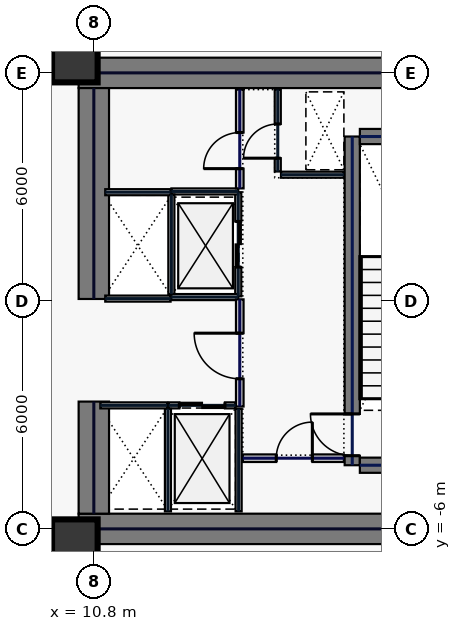
"""IFC4 building model, lengths in metres.
Left out: names, types, materials, properties, quantities, classifications, styles, units other than length and angle.
Written with IfcOpenShell. Run it as: python <this file> out.ifc"""

import sys

from ifc_helpers import new_model, si_unit, direction, frame, frame_2d, origin, origin_2d, place, context, subcontext, project, spatial, rectangle, hollow_rectangle, extrude, element, fill, save


model = new_model("IFC4")
c1 = context("Model", 3, precision=1e-05, world=origin(), true_north=direction((0.0, 1.0)))
c2 = subcontext(c1, "Body", "Model", "MODEL_VIEW")
j1 = project(units=[si_unit("LENGTHUNIT", "METRE"), si_unit("PLANEANGLEUNIT", "RADIAN")], contexts=[c1])
p1 = place(None, origin())
s1 = spatial("IfcSite", under=j1, at=p1, CompositionType="ELEMENT")
p2 = place(p1, origin())
s2 = spatial("IfcBuilding", under=s1, at=p2, CompositionType="ELEMENT")
p3 = place(p2, frame((0.0, 0.0, 43.4)))
s3 = spatial("IfcBuildingStorey", under=s2, at=p3, CompositionType="ELEMENT", Elevation=43.4)
for number, where, z_axis, x_axis in (
    (1, (10.4, 6.0, 0.0), (0.0, 0.0, 1.0), (1.0, 0.0, 0.0)),
    (2, (10.4, -6.0, 0.0), (0.0, 0.0, 1.0), (1.0, 0.0, 0.0)),
):
    element("IfcWall", number, at=place(p3, frame(where, z_axis=z_axis, x_axis=x_axis)), inside=s3, PredefinedType="SHEAR", context=c2, shape_type="SweptSolid", body=[
        extrude(rectangle(XDim=11.6, YDim=0.8, at=frame_2d((5.8, 0.0))), origin(), (0.0, 0.0, 1.0), 3.74),
    ])
p4 = place(p3, frame((10.8, -5.6, 0.0), z_axis=(0.0, 0.0, 1.0), x_axis=(0.0, 1.0, 0.0)))
e3 = element("IfcWall", 3, at=p4, inside=s3, PredefinedType="SHEAR", context=c2, shape_type="SweptSolid", body=[
    extrude(rectangle(XDim=2.95, YDim=0.8, at=frame_2d((1.475, 0.0))), origin(), (0.0, 0.0, 1.0), 3.74),
])
p5 = place(p3, frame((10.8, 0.05, 0.0), z_axis=(0.0, 0.0, 1.0), x_axis=(0.0, 1.0, 0.0)))
e4 = element("IfcWall", 4, at=p5, inside=s3, PredefinedType="SHEAR", context=c2, shape_type="SweptSolid", body=[
    extrude(rectangle(XDim=5.55, YDim=0.8, at=frame_2d((2.775, 0.0))), origin(), (0.0, 0.0, 1.0), 3.74),
])
p6 = place(p3, frame((17.6, -4.325, 0.0), z_axis=(0.0, 0.0, 1.0), x_axis=(0.0, 1.0, 0.0)))
e5 = element("IfcWall", 5, at=p6, inside=s3, PredefinedType="SHEAR", context=c2, shape_type="SweptSolid", body=[
    extrude(rectangle(XDim=8.65, YDim=0.4, at=frame_2d((4.325, 0.0))), origin(), (0.0, 0.0, 1.0), 3.74),
])
p7 = place(p6, frame((0.25, 0.0, 0.0)))
e6 = element("IfcOpeningElement", 6, at=p7, cuts=e5, PredefinedType="OPENING", context=c2, shape_type="SweptSolid", body=[
    extrude(rectangle(XDim=1.1, YDim=2.2, at=frame_2d((0.55, 1.1))), frame((0.0, 0.21, 0.0), z_axis=(0.0, -1.0, 0.0), x_axis=(1.0, 0.0, 0.0)), (0.0, 0.0, 1.0), 0.42),
])
for number, where, z_axis, x_axis in (
    (7, (17.8, -4.325, 0.0), (0.0, 0.0, 1.0), (1.0, 0.0, 0.0)),
    (8, (17.8, 4.325, 0.0), (0.0, 0.0, 1.0), (1.0, 0.0, 0.0)),
):
    element("IfcWall", number, at=place(p3, frame(where, z_axis=z_axis, x_axis=x_axis)), inside=s3, PredefinedType="SHEAR", context=c2, shape_type="SweptSolid", body=[
        extrude(rectangle(XDim=3.4, YDim=0.4, at=frame_2d((1.7, 0.0))), origin(), (0.0, 0.0, 1.0), 3.74),
    ])
for number, where, z_axis, x_axis in (
    (9, (10.3, -6.35, 0.0), (0.0, 0.0, 1.0), (1.0, 0.0, 0.0)),
    (10, (10.3, 6.35, 0.0), (0.0, 0.0, 1.0), (1.0, 0.0, 0.0)),
):
    element("IfcColumn", number, at=place(p3, frame(where, z_axis=z_axis, x_axis=x_axis)), inside=s3, PredefinedType="COLUMN", context=c2, shape_type="SweptSolid", body=[
        extrude(hollow_rectangle(XDim=1.2, YDim=1.2, WallThickness=0.05, at=origin_2d()), origin(), (0.0, 0.0, 1.0), 3.74),
    ])
p8 = place(p3, frame((14.6, 0.12, 0.0), z_axis=(0.0, 0.0, 1.0), x_axis=(0.0, 1.0, 0.0)))
e11 = element("IfcWall", 11, at=p8, inside=s3, PredefinedType="PARTITIONING", context=c2, shape_type="SweptSolid", body=[
    extrude(rectangle(XDim=2.74, YDim=0.16, at=frame_2d((1.37, 0.0))), origin(), (0.0, 0.0, 1.0), 3.74),
])
p9 = place(p8, frame((0.77, 0.0, 0.0)))
e12 = element("IfcOpeningElement", 12, at=p9, cuts=e11, PredefinedType="OPENING", context=c2, shape_type="SweptSolid", body=[
    extrude(rectangle(XDim=1.2, YDim=2.2, at=frame_2d((0.6, 1.1))), frame((0.0, 0.09, 0.0), z_axis=(0.0, -1.0, 0.0), x_axis=(1.0, 0.0, 0.0)), (0.0, 0.0, 1.0), 0.18),
])
for number, where, z_axis, x_axis in (
    (13, (12.84, 0.1, 0.0), (0.0, 0.0, 1.0), (1.0, 0.0, 0.0)),
    (14, (12.84, 2.88, 0.0), (0.0, 0.0, 1.0), (1.0, 0.0, 0.0)),
):
    element("IfcWall", number, at=place(p3, frame(where, z_axis=z_axis, x_axis=x_axis)), inside=s3, PredefinedType="PARTITIONING", context=c2, shape_type="SweptSolid", body=[
        extrude(rectangle(XDim=1.76, YDim=0.16, at=frame_2d((0.88, 0.0))), origin(), (0.0, 0.0, 1.0), 3.74),
    ])
p10 = place(p3, frame((12.84, 0.18, 0.0), z_axis=(0.0, 0.0, 1.0), x_axis=(0.0, 1.0, 0.0)))
e15 = element("IfcWall", 15, at=p10, inside=s3, PredefinedType="PARTITIONING", context=c2, shape_type="SweptSolid", body=[
    extrude(rectangle(XDim=2.62, YDim=0.16, at=frame_2d((1.31, 0.0))), origin(), (0.0, 0.0, 1.0), 3.74),
])
p11 = place(p3, frame((12.77, -2.75, 0.0), z_axis=(0.0, 0.0, 1.0), x_axis=(1.0, 0.0, 0.0)))
e16 = element("IfcWall", 16, at=p11, inside=s3, PredefinedType="PARTITIONING", context=c2, shape_type="SweptSolid", body=[
    extrude(rectangle(XDim=1.76, YDim=0.16, at=frame_2d((0.88, 0.0))), origin(), (0.0, 0.0, 1.0), 3.74),
])
p12 = place(p11, frame((0.28, 0.0, 0.0)))
e17 = element("IfcOpeningElement", 17, at=p12, cuts=e16, PredefinedType="OPENING", context=c2, shape_type="SweptSolid", body=[
    extrude(rectangle(XDim=1.2, YDim=2.2, at=frame_2d((0.6, 1.1))), frame((0.0, 0.09, 0.0), z_axis=(0.0, -1.0, 0.0), x_axis=(1.0, 0.0, 0.0)), (0.0, 0.0, 1.0), 0.18),
])
for number, where, z_axis, x_axis in (
    (18, (12.75, -5.54, 0.0), (0.0, 0.0, 1.0), (0.0, 1.0, 0.0)),
    (19, (14.61, -5.54, 0.0), (0.0, 0.0, 1.0), (0.0, 1.0, 0.0)),
):
    element("IfcWall", number, at=place(p3, frame(where, z_axis=z_axis, x_axis=x_axis)), inside=s3, PredefinedType="PARTITIONING", context=c2, shape_type="SweptSolid", body=[
        extrude(rectangle(XDim=2.7, YDim=0.16, at=frame_2d((1.35, 0.0))), origin(), (0.0, 0.0, 1.0), 3.74),
    ])
p13 = place(p3, frame((10.97, -2.75, 0.0), z_axis=(0.0, 0.0, 1.0), x_axis=(1.0, 0.0, 0.0)))
e20 = element("IfcWall", 20, at=p13, inside=s3, PredefinedType="PARTITIONING", context=c2, shape_type="SweptSolid", body=[
    extrude(rectangle(XDim=1.76, YDim=0.16, at=frame_2d((0.88, 0.0))), origin(), (0.0, 0.0, 1.0), 3.74),
])
for number, where, z_axis, x_axis in (
    (21, (11.1, 0.06, 0.0), (0.0, 0.0, 1.0), (1.0, 0.0, 0.0)),
    (22, (11.1, 2.86, 0.0), (0.0, 0.0, 1.0), (1.0, 0.0, 0.0)),
):
    element("IfcWall", number, at=place(p3, frame(where, z_axis=z_axis, x_axis=x_axis)), inside=s3, PredefinedType="PARTITIONING", context=c2, shape_type="SweptSolid", body=[
        extrude(rectangle(XDim=1.72, YDim=0.16, at=frame_2d((0.86, 0.0))), origin(), (0.0, 0.0, 1.0), 3.74),
    ])
p14 = place(p3, frame((15.64, 3.405, 0.0), z_axis=(0.0, 0.0, 1.0), x_axis=(0.0, 1.0, 0.0)))
e23 = element("IfcWall", 23, at=p14, inside=s3, PredefinedType="PARTITIONING", context=c2, shape_type="SweptSolid", body=[
    extrude(rectangle(XDim=2.155, YDim=0.16, at=frame_2d((1.078, 0.0))), origin(), (0.0, 0.0, 1.0), 3.74),
])
p15 = place(p14, frame((0.35, 0.0, 0.0)))
e24 = element("IfcOpeningElement", 24, at=p15, cuts=e23, PredefinedType="OPENING", context=c2, shape_type="SweptSolid", body=[
    extrude(rectangle(XDim=0.9, YDim=2.2, at=frame_2d((0.45, 1.1))), frame((0.0, 0.09, 0.0), z_axis=(0.0, -1.0, 0.0), x_axis=(1.0, 0.0, 0.0)), (0.0, 0.0, 1.0), 0.18),
])
p16 = place(p3, frame((15.725, 3.32, 0.0), z_axis=(0.0, 0.0, 1.0), x_axis=(1.0, 0.0, 0.0)))
e25 = element("IfcWall", 25, at=p16, inside=s3, PredefinedType="PARTITIONING", context=c2, shape_type="SweptSolid", body=[
    extrude(rectangle(XDim=1.655, YDim=0.16, at=frame_2d((0.827, 0.0))), origin(), (0.0, 0.0, 1.0), 3.74),
])
p17 = place(p3, frame((14.72, -4.14, 0.0), z_axis=(0.0, 0.0, 1.0), x_axis=(1.0, 0.0, 0.0)))
e26 = element("IfcWall", 26, at=p17, inside=s3, PredefinedType="SOLIDWALL", context=c2, shape_type="SweptSolid", body=[
    extrude(rectangle(XDim=2.66, YDim=0.2, at=frame_2d((1.33, 0.0))), origin(), (0.0, 0.0, 1.0), 3.74),
])
p18 = place(p17, frame((0.88, 0.0, 0.0)))
e27 = element("IfcOpeningElement", 27, at=p18, cuts=e26, PredefinedType="OPENING", context=c2, shape_type="SweptSolid", body=[
    extrude(rectangle(XDim=0.95, YDim=2.2, at=frame_2d((0.475, 1.1))), frame((0.0, 0.11, 0.0), z_axis=(0.0, -1.0, 0.0), x_axis=(1.0, 0.0, 0.0)), (0.0, 0.0, 1.0), 0.22),
])
p19 = place(p3, frame((14.64, 2.96, 0.0), z_axis=(0.0, 0.0, 1.0), x_axis=(0.0, 1.0, 0.0)))
e28 = element("IfcWall", 28, at=p19, inside=s3, PredefinedType="SOLIDWALL", context=c2, shape_type="SweptSolid", body=[
    extrude(rectangle(XDim=2.6, YDim=0.2, at=frame_2d((1.3, 0.0))), origin(), (0.0, 0.0, 1.0), 3.74),
])
p20 = place(p19, frame((0.52, 0.0, 0.0)))
e29 = element("IfcOpeningElement", 29, at=p20, cuts=e28, PredefinedType="OPENING", context=c2, shape_type="SweptSolid", body=[
    extrude(rectangle(XDim=0.95, YDim=2.2, at=frame_2d((0.475, 1.1))), frame((0.0, 0.11, 0.0), z_axis=(0.0, -1.0, 0.0), x_axis=(1.0, 0.0, 0.0)), (0.0, 0.0, 1.0), 0.22),
])
p21 = place(p3, frame((14.64, -2.78, 0.0), z_axis=(0.0, 0.0, 1.0), x_axis=(0.0, 1.0, 0.0)))
e30 = element("IfcWall", 30, at=p21, inside=s3, PredefinedType="SOLIDWALL", context=c2, shape_type="SweptSolid", body=[
    extrude(rectangle(XDim=2.82, YDim=0.2, at=frame_2d((1.41, 0.0))), origin(), (0.0, 0.0, 1.0), 3.74),
])
p22 = place(p21, frame((0.73, 0.0, 0.0)))
e31 = element("IfcOpeningElement", 31, at=p22, cuts=e30, PredefinedType="OPENING", context=c2, shape_type="SweptSolid", body=[
    extrude(rectangle(XDim=1.2, YDim=2.2, at=frame_2d((0.6, 1.1))), frame((0.0, 0.11, 0.0), z_axis=(0.0, -1.0, 0.0), x_axis=(1.0, 0.0, 0.0)), (0.0, 0.0, 1.0), 0.22),
])
p23 = place(p3, frame((10.58, 7.185, 0.0), z_axis=(0.0, 0.0, 1.0), x_axis=(0.0, -1.0, 0.0)))
e32 = element("IfcWall", 32, at=p23, inside=s3, PredefinedType="PARTITIONING", context=c2, shape_type="SweptSolid", body=[
    extrude(rectangle(XDim=0.765, YDim=0.16, at=frame_2d((0.383, 0.0))), origin(), (0.0, 0.0, 1.0), 3.74),
])
p24 = place(p3, frame((10.58, -6.42, 0.0), z_axis=(0.0, 0.0, 1.0), x_axis=(0.0, -1.0, 0.0)))
e33 = element("IfcWall", 33, at=p24, inside=s3, PredefinedType="PARTITIONING", context=c2, shape_type="SweptSolid", body=[
    extrude(rectangle(XDim=0.565, YDim=0.16, at=frame_2d((0.283, 0.0))), origin(), (0.0, 0.0, 1.0), 3.74),
])
p25 = place(p7, origin())
e34 = element("IfcDoor", 34, at=p25, inside=s3, OperationType="SINGLE_SWING_RIGHT", PredefinedType="DOOR", context=c2, shape_type="SweptSolid", body=[
    extrude(rectangle(XDim=1.1, YDim=2.2, at=frame_2d((0.55, 1.1))), frame((0.0, 0.025, 0.0), z_axis=(0.0, -1.0, 0.0), x_axis=(1.0, 0.0, 0.0)), (0.0, 0.0, 1.0), 0.05),
])
fill(e6, e34)
p26 = place(p9, origin())
e35 = element("IfcDoor", 35, at=p26, inside=s3, OperationType="SLIDING_TO_LEFT", PredefinedType="DOOR", context=c2, shape_type="SweptSolid", body=[
    extrude(rectangle(XDim=1.2, YDim=2.2, at=frame_2d((0.6, 1.1))), frame((0.0, 0.025, 0.0), z_axis=(0.0, -1.0, 0.0), x_axis=(1.0, 0.0, 0.0)), (0.0, 0.0, 1.0), 0.05),
])
fill(e12, e35)
p27 = place(p12, origin())
e36 = element("IfcDoor", 36, at=p27, inside=s3, OperationType="SLIDING_TO_LEFT", PredefinedType="DOOR", context=c2, shape_type="SweptSolid", body=[
    extrude(rectangle(XDim=1.2, YDim=2.2, at=frame_2d((0.6, 1.1))), frame((0.0, 0.025, 0.0), z_axis=(0.0, -1.0, 0.0), x_axis=(1.0, 0.0, 0.0)), (0.0, 0.0, 1.0), 0.05),
])
fill(e17, e36)
p28 = place(p15, origin())
e37 = element("IfcDoor", 37, at=p28, inside=s3, OperationType="SINGLE_SWING_LEFT", PredefinedType="DOOR", context=c2, shape_type="SweptSolid", body=[
    extrude(rectangle(XDim=0.9, YDim=2.2, at=frame_2d((0.45, 1.1))), frame((0.0, 0.025, 0.0), z_axis=(0.0, -1.0, 0.0), x_axis=(1.0, 0.0, 0.0)), (0.0, 0.0, 1.0), 0.05),
])
fill(e24, e37)
p29 = place(p18, origin())
e38 = element("IfcDoor", 38, at=p29, inside=s3, OperationType="SINGLE_SWING_RIGHT", PredefinedType="DOOR", context=c2, shape_type="SweptSolid", body=[
    extrude(rectangle(XDim=0.95, YDim=2.2, at=frame_2d((0.475, 1.1))), frame((0.0, 0.025, 0.0), z_axis=(0.0, -1.0, 0.0), x_axis=(1.0, 0.0, 0.0)), (0.0, 0.0, 1.0), 0.05),
])
fill(e27, e38)
p30 = place(p20, origin())
e39 = element("IfcDoor", 39, at=p30, inside=s3, OperationType="SINGLE_SWING_LEFT", PredefinedType="DOOR", context=c2, shape_type="SweptSolid", body=[
    extrude(rectangle(XDim=0.95, YDim=2.2, at=frame_2d((0.475, 1.1))), frame((0.0, 0.025, 0.0), z_axis=(0.0, -1.0, 0.0), x_axis=(1.0, 0.0, 0.0)), (0.0, 0.0, 1.0), 0.05),
])
fill(e29, e39)
p31 = place(p22, origin())
e40 = element("IfcDoor", 40, at=p31, inside=s3, OperationType="SINGLE_SWING_RIGHT", PredefinedType="DOOR", context=c2, shape_type="SweptSolid", body=[
    extrude(rectangle(XDim=1.2, YDim=2.2, at=frame_2d((0.6, 1.1))), frame((0.0, 0.025, 0.0), z_axis=(0.0, -1.0, 0.0), x_axis=(1.0, 0.0, 0.0)), (0.0, 0.0, 1.0), 0.05),
])
fill(e31, e40)
save(model, sys.argv[1])
